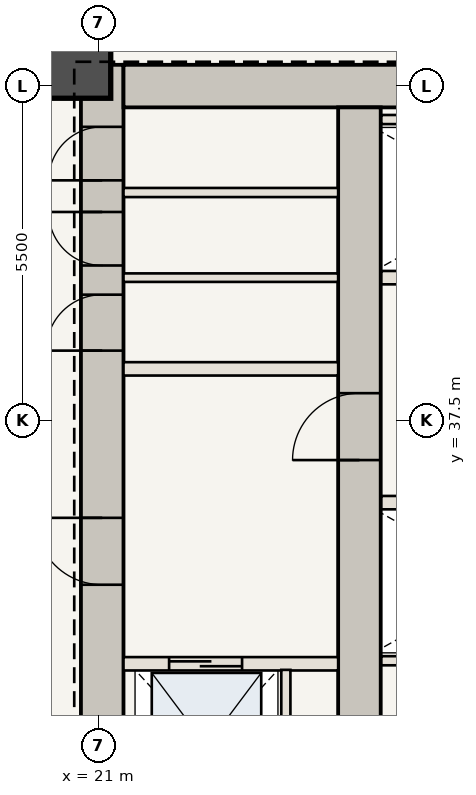
"""IFC4 building model, lengths in metres.
Left out: names, types, materials, properties, quantities, classifications, styles, units other than length and angle.
Written with IfcOpenShell. Run it as: python <this file> out.ifc"""

import sys

from ifc_helpers import new_model, si_unit, direction, frame, frame_2d, origin, origin_2d, place, context, subcontext, project, spatial, rectangle, extrude, element, fill, save


model = new_model("IFC4")
c1 = context("Model", 3, precision=1e-05, world=origin(), true_north=direction((0.0, 1.0)))
c2 = subcontext(c1, "Body", "Model", "MODEL_VIEW")
j1 = project(units=[si_unit("LENGTHUNIT", "METRE"), si_unit("PLANEANGLEUNIT", "RADIAN")], contexts=[c1])
p1 = place(None, origin())
s1 = spatial("IfcSite", under=j1, at=p1, CompositionType="ELEMENT")
p2 = place(p1, origin())
s2 = spatial("IfcBuilding", under=s1, at=p2, CompositionType="ELEMENT")
p3 = place(p2, frame((0.0, 0.0, 45.85)))
s3 = spatial("IfcBuildingStorey", under=s2, at=p3, CompositionType="ELEMENT", Elevation=45.85)
p4 = place(p3, frame((21.06, 30.6, 0.0), z_axis=(0.0, 0.0, 1.0), x_axis=(0.0, 1.0, 0.0)))
e1 = element("IfcWall", 1, at=p4, inside=s3, PredefinedType="SHEAR", context=c2, shape_type="SweptSolid", body=[
    extrude(rectangle(XDim=12.75, YDim=0.7, at=frame_2d((6.375, 0.0))), origin(), (0.0, 0.0, 1.0), 3.5),
])
p5 = place(p4, frame((4.2, 0.0, 0.0)))
e2 = element("IfcOpeningElement", 2, at=p5, cuts=e1, PredefinedType="OPENING", context=c2, shape_type="SweptSolid", body=[
    extrude(rectangle(XDim=1.1, YDim=2.15, at=frame_2d((0.55, 1.075))), frame((0.0, 0.36, 0.0), z_axis=(0.0, -1.0, 0.0), x_axis=(1.0, 0.0, 0.0)), (0.0, 0.0, 1.0), 0.72),
])
p6 = place(p4, frame((8.05, 0.0, 0.0)))
e3 = element("IfcOpeningElement", 3, at=p6, cuts=e1, PredefinedType="OPENING", context=c2, shape_type="SweptSolid", body=[
    extrude(rectangle(XDim=0.92, YDim=2.1, at=frame_2d((0.46, 1.05))), frame((0.0, 0.36, 0.0), z_axis=(0.0, -1.0, 0.0), x_axis=(1.0, 0.0, 0.0)), (0.0, 0.0, 1.0), 0.72),
])
p7 = place(p4, frame((9.45, 0.0, 0.0)))
e4 = element("IfcOpeningElement", 4, at=p7, cuts=e1, PredefinedType="OPENING", context=c2, shape_type="SweptSolid", body=[
    extrude(rectangle(XDim=0.88, YDim=2.1, at=frame_2d((0.44, 1.05))), frame((0.0, 0.36, 0.0), z_axis=(0.0, -1.0, 0.0), x_axis=(1.0, 0.0, 0.0)), (0.0, 0.0, 1.0), 0.72),
])
p8 = place(p4, frame((10.85, 0.0, 0.0)))
e5 = element("IfcOpeningElement", 5, at=p8, cuts=e1, PredefinedType="OPENING", context=c2, shape_type="SweptSolid", body=[
    extrude(rectangle(XDim=0.88, YDim=2.1, at=frame_2d((0.44, 1.05))), frame((0.0, 0.36, 0.0), z_axis=(0.0, -1.0, 0.0), x_axis=(1.0, 0.0, 0.0)), (0.0, 0.0, 1.0), 0.72),
])
p9 = place(p3, frame((21.41, 43.0, 0.0), z_axis=(0.0, 0.0, 1.0), x_axis=(1.0, 0.0, 0.0)))
e6 = element("IfcWall", 6, at=p9, inside=s3, PredefinedType="SHEAR", context=c2, shape_type="SweptSolid", body=[
    extrude(rectangle(XDim=8.24, YDim=0.7, at=frame_2d((4.12, 0.0))), origin(), (0.0, 0.0, 1.0), 3.5),
])
p10 = place(p3, frame((25.29, 30.6, 0.0), z_axis=(0.0, 0.0, 1.0), x_axis=(0.0, 1.0, 0.0)))
e7 = element("IfcWall", 7, at=p10, inside=s3, PredefinedType="SHEAR", context=c2, shape_type="SweptSolid", body=[
    extrude(rectangle(XDim=12.05, YDim=0.7, at=frame_2d((6.025, 0.0))), origin(), (0.0, 0.0, 1.0), 3.5),
])
p11 = place(p10, frame((6.25, 0.0, 0.0)))
e8 = element("IfcOpeningElement", 8, at=p11, cuts=e7, PredefinedType="OPENING", context=c2, shape_type="SweptSolid", body=[
    extrude(rectangle(XDim=1.1, YDim=2.15, at=frame_2d((0.55, 1.075))), frame((0.0, 0.36, 0.0), z_axis=(0.0, -1.0, 0.0), x_axis=(1.0, 0.0, 0.0)), (0.0, 0.0, 1.0), 0.72),
])
p12 = place(p3, frame((20.65, 43.35, 0.0), z_axis=(0.0, 0.0, 1.0), x_axis=(1.0, 0.0, 0.0)))
e9 = element("IfcColumn", 9, at=p12, inside=s3, PredefinedType="COLUMN", context=c2, shape_type="SweptSolid", body=[
    extrude(rectangle(XDim=1.1, YDim=1.1, at=origin_2d()), origin(), (0.0, 0.0, 1.0), 3.5),
])
p13 = place(p3, frame((21.41, 33.5, 0.0), z_axis=(0.0, 0.0, 1.0), x_axis=(1.0, 0.0, 0.0)))
e10 = element("IfcWall", 10, at=p13, inside=s3, PredefinedType="STANDARD", context=c2, shape_type="SweptSolid", body=[
    extrude(rectangle(XDim=3.53, YDim=0.22, at=frame_2d((1.765, 0.0))), origin(), (0.0, 0.0, 1.0), 3.32),
])
p14 = place(p13, frame((0.75, 0.0, 0.0)))
e11 = element("IfcOpeningElement", 11, at=p14, cuts=e10, PredefinedType="OPENING", context=c2, shape_type="SweptSolid", body=[
    extrude(rectangle(XDim=1.2, YDim=2.2, at=frame_2d((0.6, 1.1))), frame((0.0, 0.12, 0.0), z_axis=(0.0, -1.0, 0.0), x_axis=(1.0, 0.0, 0.0)), (0.0, 0.0, 1.0), 0.24),
])
p15 = place(p3, frame((24.08, 30.75, 0.0), z_axis=(0.0, 0.0, 1.0), x_axis=(0.0, 1.0, 0.0)))
e12 = element("IfcWall", 12, at=p15, inside=s3, PredefinedType="STANDARD", context=c2, shape_type="SweptSolid", body=[
    extrude(rectangle(XDim=2.65, YDim=0.15, at=frame_2d((1.325, 0.0))), origin(), (0.0, 0.0, 1.0), 3.32),
])
p16 = place(p3, frame((21.41, 38.35, 0.0), z_axis=(0.0, 0.0, 1.0), x_axis=(1.0, 0.0, 0.0)))
e13 = element("IfcWall", 13, at=p16, inside=s3, PredefinedType="STANDARD", context=c2, shape_type="SweptSolid", body=[
    extrude(rectangle(XDim=3.53, YDim=0.22, at=frame_2d((1.765, 0.0))), origin(), (0.0, 0.0, 1.0), 3.32),
])
p17 = place(p3, frame((21.41, 39.85, 0.0), z_axis=(0.0, 0.0, 1.0), x_axis=(1.0, 0.0, 0.0)))
e14 = element("IfcWall", 14, at=p17, inside=s3, PredefinedType="STANDARD", context=c2, shape_type="SweptSolid", body=[
    extrude(rectangle(XDim=3.53, YDim=0.14, at=frame_2d((1.765, 0.0))), origin(), (0.0, 0.0, 1.0), 3.32),
])
p18 = place(p3, frame((21.41, 41.25, 0.0), z_axis=(0.0, 0.0, 1.0), x_axis=(1.0, 0.0, 0.0)))
e15 = element("IfcWall", 15, at=p18, inside=s3, PredefinedType="STANDARD", context=c2, shape_type="SweptSolid", body=[
    extrude(rectangle(XDim=3.53, YDim=0.15, at=frame_2d((1.765, 0.0))), origin(), (0.0, 0.0, 1.0), 3.32),
])
p19 = place(p3, frame((25.65, 36.15, 0.0), z_axis=(0.0, 0.0, 1.0), x_axis=(1.0, 0.0, 0.0)))
e16 = element("IfcWall", 16, at=p19, inside=s3, PredefinedType="STANDARD", context=c2, shape_type="SweptSolid", body=[
    extrude(rectangle(XDim=4.3, YDim=0.22, at=frame_2d((2.15, 0.0))), origin(), (0.0, 0.0, 1.0), 3.32),
])
p20 = place(p3, frame((25.65, 33.55, 0.0), z_axis=(0.0, 0.0, 1.0), x_axis=(1.0, 0.0, 0.0)))
e17 = element("IfcWall", 17, at=p20, inside=s3, PredefinedType="STANDARD", context=c2, shape_type="SweptSolid", body=[
    extrude(rectangle(XDim=4.2, YDim=0.15, at=frame_2d((2.1, 0.0))), origin(), (0.0, 0.0, 1.0), 3.32),
])
p21 = place(p3, frame((25.65, 39.85, 0.0), z_axis=(0.0, 0.0, 1.0), x_axis=(1.0, 0.0, 0.0)))
e18 = element("IfcWall", 18, at=p21, inside=s3, PredefinedType="STANDARD", context=c2, shape_type="SweptSolid", body=[
    extrude(rectangle(XDim=4.3, YDim=0.22, at=frame_2d((2.15, 0.0))), origin(), (0.0, 0.0, 1.0), 3.32),
])
p22 = place(p3, frame((25.65, 42.45, 0.0), z_axis=(0.0, 0.0, 1.0), x_axis=(1.0, 0.0, 0.0)))
e19 = element("IfcWall", 19, at=p22, inside=s3, PredefinedType="STANDARD", context=c2, shape_type="SweptSolid", body=[
    extrude(rectangle(XDim=4.2, YDim=0.15, at=frame_2d((2.1, 0.0))), origin(), (0.0, 0.0, 1.0), 3.32),
])
p23 = place(p5, origin())
e20 = element("IfcDoor", 20, at=p23, inside=s3, OperationType="SINGLE_SWING_RIGHT", PredefinedType="DOOR", context=c2, shape_type="SweptSolid", body=[
    extrude(rectangle(XDim=1.1, YDim=2.15, at=frame_2d((0.55, 1.075))), frame((0.0, 0.025, 0.0), z_axis=(0.0, -1.0, 0.0), x_axis=(1.0, 0.0, 0.0)), (0.0, 0.0, 1.0), 0.05),
])
fill(e2, e20)
p24 = place(p11, origin())
e21 = element("IfcDoor", 21, at=p24, inside=s3, OperationType="SINGLE_SWING_LEFT", PredefinedType="DOOR", context=c2, shape_type="SweptSolid", body=[
    extrude(rectangle(XDim=1.1, YDim=2.15, at=frame_2d((0.55, 1.075))), frame((0.0, 0.025, 0.0), z_axis=(0.0, -1.0, 0.0), x_axis=(1.0, 0.0, 0.0)), (0.0, 0.0, 1.0), 0.05),
])
fill(e8, e21)
p25 = place(p6, origin())
e22 = element("IfcDoor", 22, at=p25, inside=s3, OperationType="SINGLE_SWING_LEFT", PredefinedType="DOOR", context=c2, shape_type="SweptSolid", body=[
    extrude(rectangle(XDim=0.92, YDim=2.1, at=frame_2d((0.46, 1.05))), frame((0.0, 0.025, 0.0), z_axis=(0.0, -1.0, 0.0), x_axis=(1.0, 0.0, 0.0)), (0.0, 0.0, 1.0), 0.05),
])
fill(e3, e22)
p26 = place(p7, origin())
e23 = element("IfcDoor", 23, at=p26, inside=s3, OperationType="SINGLE_SWING_RIGHT", PredefinedType="DOOR", context=c2, shape_type="SweptSolid", body=[
    extrude(rectangle(XDim=0.88, YDim=2.1, at=frame_2d((0.44, 1.05))), frame((0.0, 0.025, 0.0), z_axis=(0.0, -1.0, 0.0), x_axis=(1.0, 0.0, 0.0)), (0.0, 0.0, 1.0), 0.05),
])
fill(e4, e23)
p27 = place(p8, origin())
e24 = element("IfcDoor", 24, at=p27, inside=s3, OperationType="SINGLE_SWING_LEFT", PredefinedType="DOOR", context=c2, shape_type="SweptSolid", body=[
    extrude(rectangle(XDim=0.88, YDim=2.1, at=frame_2d((0.44, 1.05))), frame((0.0, 0.025, 0.0), z_axis=(0.0, -1.0, 0.0), x_axis=(1.0, 0.0, 0.0)), (0.0, 0.0, 1.0), 0.05),
])
fill(e5, e24)
p28 = place(p14, origin())
e25 = element("IfcDoor", 25, at=p28, inside=s3, OperationType="DOUBLE_DOOR_SLIDING", PredefinedType="DOOR", context=c2, shape_type="SweptSolid", body=[
    extrude(rectangle(XDim=1.2, YDim=2.2, at=frame_2d((0.6, 1.1))), frame((0.0, 0.025, 0.0), z_axis=(0.0, -1.0, 0.0), x_axis=(1.0, 0.0, 0.0)), (0.0, 0.0, 1.0), 0.05),
])
fill(e11, e25)
save(model, sys.argv[1])
